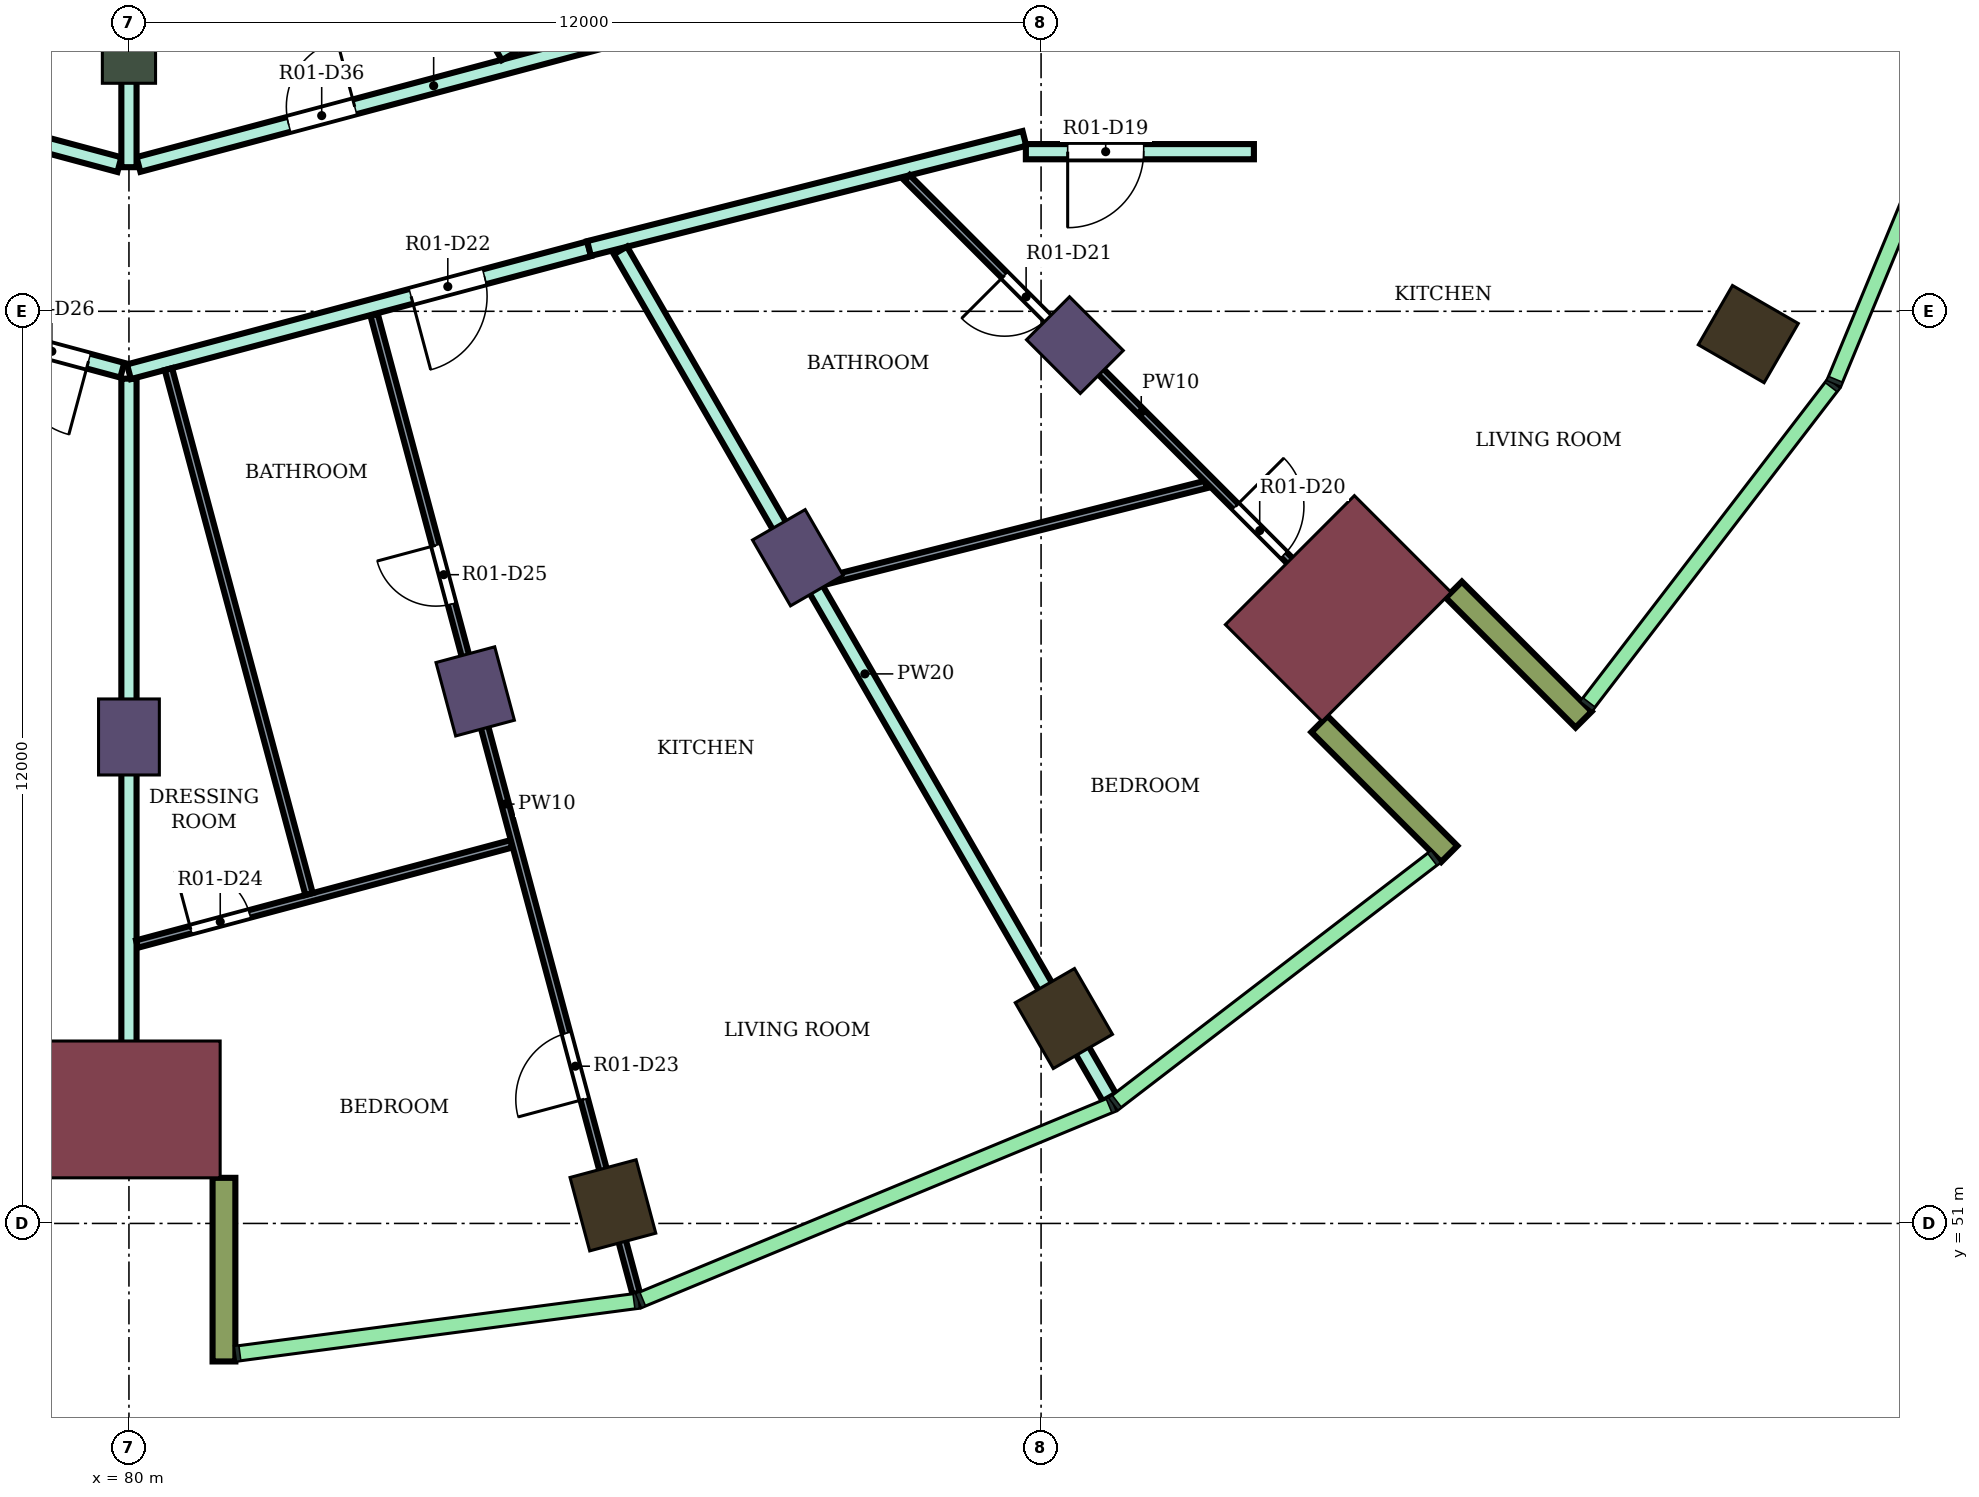
"""IFC4 building model, lengths in metres.
Left out: names, types, materials, properties, quantities, classifications, styles, units other than length and angle.
Written with IfcOpenShell. Run it as: python <this file> out.ifc"""

import sys

from ifc_helpers import new_model, si_unit, direction, frame, frame_2d, origin, origin_2d, place, context, subcontext, project, spatial, rectangle, extrude, element, fill, save


model = new_model("IFC4")
c1 = context("Model", 3, precision=1e-05, world=origin(), true_north=direction((0.0, 1.0)))
c2 = subcontext(c1, "Body", "Model", "MODEL_VIEW")
j1 = project(units=[si_unit("LENGTHUNIT", "METRE"), si_unit("PLANEANGLEUNIT", "RADIAN")], contexts=[c1])
p1 = place(None, origin())
s1 = spatial("IfcSite", under=j1, at=p1, CompositionType="ELEMENT")
p2 = place(p1, origin())
s2 = spatial("IfcBuilding", under=s1, at=p2, CompositionType="ELEMENT")
p3 = place(p2, frame((0.0, 0.0, 165.9)))
s3 = spatial("IfcBuildingStorey", under=s2, at=p3, CompositionType="ELEMENT", Elevation=165.9)
for number, where, z_axis, x_axis in (
    (1, (86.367, 51.238, 0.0), (0.0, 0.0, 1.0), (0.259, -0.966, 0.0)),
    (2, (92.3, 53.696, 0.0), (0.0, 0.0, 1.0), (0.5, -0.866, 0.0)),
    (3, (101.304, 62.7, 0.0), (0.0, 0.0, 1.0), (0.866, -0.5, 0.0)),
):
    element("IfcColumn", number, at=place(p3, frame(where, z_axis=z_axis, x_axis=x_axis)), inside=s3, PredefinedType="COLUMN", context=c2, shape_type="SweptSolid", body=[
        extrude(rectangle(XDim=1.0, YDim=0.9, at=origin_2d()), origin(), (0.0, 0.0, 1.0), 4.1),
    ])
for number, where, z_axis, x_axis in (
    (4, (80.0, 57.4, 0.0), (0.0, 0.0, 1.0), (0.0, -1.0, 0.0)),
    (5, (84.555, 58.0, 0.0), (0.0, 0.0, 1.0), (0.259, -0.966, 0.0)),
    (6, (88.8, 59.758, 0.0), (0.0, 0.0, 1.0), (0.5, -0.866, 0.0)),
    (7, (92.445, 62.555, 0.0), (0.0, 0.0, 1.0), (0.707, -0.707, 0.0)),
):
    element("IfcColumn", number, at=place(p3, frame(where, z_axis=z_axis, x_axis=x_axis)), inside=s3, PredefinedType="COLUMN", context=c2, shape_type="SweptSolid", body=[
        extrude(rectangle(XDim=1.0, YDim=0.8, at=origin_2d()), origin(), (0.0, 0.0, 1.0), 4.1),
    ])
p4 = place(p3, frame((80.0, 66.4, 0.0), z_axis=(0.0, 0.0, 1.0), x_axis=(0.0, -1.0, 0.0)))
e8 = element("IfcColumn", 8, at=p4, inside=s3, PredefinedType="COLUMN", context=c2, shape_type="SweptSolid", body=[
    extrude(rectangle(XDim=0.8, YDim=0.7, at=origin_2d()), origin(), (0.0, 0.0, 1.0), 4.1),
])
for number, where, z_axis, x_axis in (
    (9, (80.0, 52.5, 0.0), (0.0, 0.0, 1.0), (0.0, -1.0, 0.0)),
    (10, (95.91, 59.09, 0.0), (0.0, 0.0, 1.0), (0.707, -0.707, 0.0)),
):
    element("IfcColumn", number, at=place(p3, frame(where, z_axis=z_axis, x_axis=x_axis)), inside=s3, PredefinedType="COLUMN", context=c2, shape_type="SweptSolid", body=[
        extrude(rectangle(XDim=1.8, YDim=2.4, at=origin_2d()), origin(), (0.0, 0.0, 1.0), 4.1),
    ])
for number, where, z_axis, x_axis in (
    (11, (81.25, 51.6, 0.0), (0.0, 0.0, 1.0), (0.0, -1.0, 0.0)),
    (12, (95.662, 57.57, 0.0), (0.0, 0.0, 1.0), (0.707, -0.707, 0.0)),
    (13, (97.43, 59.338, 0.0), (0.0, 0.0, 1.0), (0.707, -0.707, 0.0)),
):
    element("IfcWall", number, at=place(p3, frame(where, z_axis=z_axis, x_axis=x_axis)), inside=s3, PredefinedType="NOTDEFINED", context=c2, shape_type="SweptSolid", body=[
        extrude(rectangle(XDim=2.416, YDim=0.3, at=frame_2d((1.208, 0.0))), origin(), (0.0, 0.0, 1.0), 4.1),
    ])
p5 = place(p3, frame((74.15, 63.772, 0.0), z_axis=(0.0, 0.0, 1.0), x_axis=(0.965807109237, -0.259261697417, 0.0)))
e14 = element("IfcWall", 14, at=p5, inside=s3, PredefinedType="PARTITIONING", context=c2, shape_type="SweptSolid", body=[
    extrude(rectangle(XDim=5.967, YDim=0.2, at=frame_2d((2.983, 0.0))), origin(), (0.0, 0.0, 1.0), 3.65),
])
p6 = place(p5, frame((4.507, 0.0, 0.0)))
e15 = element("IfcOpeningElement", 15, at=p6, cuts=e14, PredefinedType="OPENING", context=c2, shape_type="SweptSolid", body=[
    extrude(rectangle(XDim=1.0, YDim=2.1, at=frame_2d((0.5, 1.05))), frame((0.0, 0.11, 0.0), z_axis=(0.0, -1.0, 0.0), x_axis=(1.0, 0.0, 0.0)), (0.0, 0.0, 1.0), 0.22),
])
p7 = place(p3, frame((74.603, 66.342, 0.0), z_axis=(0.0, 0.0, 1.0), x_axis=(0.965920893652, -0.258837453254, 0.0)))
e16 = element("IfcWall", 16, at=p7, inside=s3, PredefinedType="PARTITIONING", context=c2, shape_type="SweptSolid", body=[
    extrude(rectangle(XDim=5.458, YDim=0.2, at=frame_2d((2.729, 0.0))), origin(), (0.0, 0.0, 1.0), 3.65),
])
p8 = place(p7, frame((2.512, 0.0, 0.0)))
e17 = element("IfcOpeningElement", 17, at=p8, cuts=e16, PredefinedType="OPENING", context=c2, shape_type="SweptSolid", body=[
    extrude(rectangle(XDim=0.9, YDim=2.1, at=frame_2d((0.45, 1.05))), frame((0.0, 0.11, 0.0), z_axis=(0.0, -1.0, 0.0), x_axis=(1.0, 0.0, 0.0)), (0.0, 0.0, 1.0), 0.22),
])
p9 = place(p3, frame((80.125, 64.932, 0.0), z_axis=(0.0, 0.0, 1.0), x_axis=(0.966236955806, 0.257655089674, 0.0)))
e18 = element("IfcWall", 18, at=p9, inside=s3, PredefinedType="PARTITIONING", context=c2, shape_type="SweptSolid", body=[
    extrude(rectangle(XDim=8.039, YDim=0.2, at=frame_2d((4.02, 0.0))), origin(), (0.0, 0.0, 1.0), 3.65),
])
p10 = place(p9, frame((6.298, 0.0, 0.0)))
e19 = element("IfcOpeningElement", 19, at=p10, cuts=e18, PredefinedType="OPENING", context=c2, shape_type="SweptSolid", body=[
    extrude(rectangle(XDim=0.9, YDim=2.1, at=frame_2d((0.45, 1.05))), frame((0.0, 0.11, 0.0), z_axis=(0.0, -1.0, 0.0), x_axis=(1.0, 0.0, 0.0)), (0.0, 0.0, 1.0), 0.22),
])
p11 = place(p9, frame((2.045, 0.0, 0.0)))
e20 = element("IfcOpeningElement", 20, at=p11, cuts=e18, PredefinedType="OPENING", context=c2, shape_type="SweptSolid", body=[
    extrude(rectangle(XDim=0.9, YDim=2.1, at=frame_2d((0.45, 1.05))), frame((0.0, 0.11, 0.0), z_axis=(0.0, -1.0, 0.0), x_axis=(1.0, 0.0, 0.0)), (0.0, 0.0, 1.0), 0.22),
])
p12 = place(p3, frame((80.0, 51.8, 0.0), z_axis=(0.0, 0.0, 1.0), x_axis=(0.0, 1.0, 0.0)))
e21 = element("IfcWall", 21, at=p12, inside=s3, PredefinedType="PARTITIONING", context=c2, shape_type="SweptSolid", body=[
    extrude(rectangle(XDim=10.314, YDim=0.2, at=frame_2d((5.157, 0.0))), origin(), (0.0, 0.0, 1.0), 3.65),
])
p13 = place(p3, frame((80.0, 62.205, 0.0), z_axis=(0.0, 0.0, 1.0), x_axis=(0.966104192593, 0.258152453124, 0.0)))
e22 = element("IfcWall", 22, at=p13, inside=s3, PredefinedType="PARTITIONING", context=c2, shape_type="SweptSolid", body=[
    extrude(rectangle(XDim=6.266, YDim=0.2, at=frame_2d((3.133, 0.0))), origin(), (0.0, 0.0, 1.0), 3.65),
])
p14 = place(p13, frame((3.842, 0.0, 0.0)))
e23 = element("IfcOpeningElement", 23, at=p14, cuts=e22, PredefinedType="OPENING", context=c2, shape_type="SweptSolid", body=[
    extrude(rectangle(XDim=1.0, YDim=2.1, at=frame_2d((0.5, 1.05))), frame((0.0, 0.11, 0.0), z_axis=(0.0, -1.0, 0.0), x_axis=(1.0, 0.0, 0.0)), (0.0, 0.0, 1.0), 0.22),
])
p15 = place(p3, frame((80.0, 64.896, 0.0), z_axis=(0.0, 0.0, 1.0), x_axis=(0.0, 1.0, 0.0)))
e24 = element("IfcWall", 24, at=p15, inside=s3, PredefinedType="PARTITIONING", context=c2, shape_type="SweptSolid", body=[
    extrude(rectangle(XDim=2.405, YDim=0.2, at=frame_2d((1.203, 0.0))), origin(), (0.0, 0.0, 1.0), 3.65),
])
p16 = place(p3, frame((83.85, 68.333, 0.0), z_axis=(0.0, 0.0, 1.0), x_axis=(0.499953638813, -0.866052168773, 0.0)))
e25 = element("IfcWall", 25, at=p16, inside=s3, PredefinedType="PARTITIONING", context=c2, shape_type="SweptSolid", body=[
    extrude(rectangle(XDim=2.285, YDim=0.2, at=frame_2d((1.143, 0.0))), origin(), (0.0, 0.0, 1.0), 3.65),
])
p17 = place(p3, frame((86.053, 63.826, 0.0), z_axis=(0.0, 0.0, 1.0), x_axis=(0.969490004987, 0.245130843083, 0.0)))
e26 = element("IfcWall", 26, at=p17, inside=s3, PredefinedType="PARTITIONING", context=c2, shape_type="SweptSolid", body=[
    extrude(rectangle(XDim=5.908, YDim=0.2, at=frame_2d((2.954, 0.0))), origin(), (0.0, 0.0, 1.0), 3.65),
])
p18 = place(p3, frame((86.466, 63.801, 0.0), z_axis=(0.0, 0.0, 1.0), x_axis=(0.499951314491, -0.866053510551, 0.0)))
e27 = element("IfcWall", 27, at=p18, inside=s3, PredefinedType="PARTITIONING", context=c2, shape_type="SweptSolid", body=[
    extrude(rectangle(XDim=12.866, YDim=0.2, at=frame_2d((6.433, 0.0))), origin(), (0.0, 0.0, 1.0), 3.65),
])
p19 = place(p3, frame((91.8, 65.1, 0.0), z_axis=(0.0, 0.0, 1.0), x_axis=(1.0, 0.0, 0.0)))
e28 = element("IfcWall", 28, at=p19, inside=s3, PredefinedType="PARTITIONING", context=c2, shape_type="SweptSolid", body=[
    extrude(rectangle(XDim=3.0, YDim=0.2, at=frame_2d((1.5, 0.0))), origin(), (0.0, 0.0, 1.0), 3.65),
])
p20 = place(p19, frame((0.55, 0.0, 0.0)))
e29 = element("IfcOpeningElement", 29, at=p20, cuts=e28, PredefinedType="OPENING", context=c2, shape_type="SweptSolid", body=[
    extrude(rectangle(XDim=1.0, YDim=2.1, at=frame_2d((0.5, 1.05))), frame((0.0, 0.11, 0.0), z_axis=(0.0, -1.0, 0.0), x_axis=(1.0, 0.0, 0.0)), (0.0, 0.0, 1.0), 0.22),
])
p21 = place(p3, frame((80.106, 54.676, 0.0), z_axis=(0.0, 0.0, 1.0), x_axis=(0.965976901679, 0.258628353863, 0.0)))
e30 = element("IfcWall", 30, at=p21, inside=s3, PredefinedType="PARTITIONING", context=c2, shape_type="SweptSolid", body=[
    extrude(rectangle(XDim=5.097, YDim=0.1, at=frame_2d((2.549, 0.0))), origin(), (0.0, 0.0, 1.0), 3.65),
])
p22 = place(p21, frame((0.733, 0.0, 0.0)))
e31 = element("IfcOpeningElement", 31, at=p22, cuts=e30, PredefinedType="OPENING", context=c2, shape_type="SweptSolid", body=[
    extrude(rectangle(XDim=0.8, YDim=2.1, at=frame_2d((0.4, 1.05))), frame((0.0, 0.06, 0.0), z_axis=(0.0, -1.0, 0.0), x_axis=(1.0, 0.0, 0.0)), (0.0, 0.0, 1.0), 0.12),
])
p23 = place(p3, frame((80.519, 62.239, 0.0), z_axis=(0.0, 0.0, 1.0), x_axis=(0.25878046533, -0.965936162882, 0.0)))
e32 = element("IfcWall", 32, at=p23, inside=s3, PredefinedType="PARTITIONING", context=c2, shape_type="SweptSolid", body=[
    extrude(rectangle(XDim=7.149, YDim=0.1, at=frame_2d((3.575, 0.0))), origin(), (0.0, 0.0, 1.0), 3.65),
])
p24 = place(p3, frame((83.225, 62.954, 0.0), z_axis=(0.0, 0.0, 1.0), x_axis=(0.258715941946, -0.965953446799, 0.0)))
e33 = element("IfcWall", 33, at=p24, inside=s3, PredefinedType="PARTITIONING", context=c2, shape_type="SweptSolid", body=[
    extrude(rectangle(XDim=13.328, YDim=0.1, at=frame_2d((6.664, 0.0))), origin(), (0.0, 0.0, 1.0), 3.65),
])
p25 = place(p24, frame((9.784, 0.0, 0.0)))
e34 = element("IfcOpeningElement", 34, at=p25, cuts=e33, PredefinedType="OPENING", context=c2, shape_type="SweptSolid", body=[
    extrude(rectangle(XDim=0.9, YDim=2.1, at=frame_2d((0.45, 1.05))), frame((0.0, 0.06, 0.0), z_axis=(0.0, -1.0, 0.0), x_axis=(1.0, 0.0, 0.0)), (0.0, 0.0, 1.0), 0.12),
])
p26 = place(p24, frame((3.14, 0.0, 0.0)))
e35 = element("IfcOpeningElement", 35, at=p26, cuts=e33, PredefinedType="OPENING", context=c2, shape_type="SweptSolid", body=[
    extrude(rectangle(XDim=0.8, YDim=2.1, at=frame_2d((0.4, 1.05))), frame((0.0, 0.06, 0.0), z_axis=(0.0, -1.0, 0.0), x_axis=(1.0, 0.0, 0.0)), (0.0, 0.0, 1.0), 0.12),
])
p27 = place(p3, frame((89.106, 59.441, 0.0), z_axis=(0.0, 0.0, 1.0), x_axis=(0.969462385749, 0.245240051009, 0.0)))
e36 = element("IfcWall", 36, at=p27, inside=s3, PredefinedType="PARTITIONING", context=c2, shape_type="SweptSolid", body=[
    extrude(rectangle(XDim=5.223, YDim=0.1, at=frame_2d((2.612, 0.0))), origin(), (0.0, 0.0, 1.0), 3.65),
])
p28 = place(p3, frame((90.236, 64.758, 0.0), z_axis=(0.0, 0.0, 1.0), x_axis=(0.706938769128, -0.707274753334, 0.0)))
e37 = element("IfcWall", 37, at=p28, inside=s3, PredefinedType="PARTITIONING", context=c2, shape_type="SweptSolid", body=[
    extrude(rectangle(XDim=8.72, YDim=0.1, at=frame_2d((4.36, 0.0))), origin(), (0.0, 0.0, 1.0), 3.65),
])
p29 = place(p28, frame((6.115, 0.0, 0.0)))
e38 = element("IfcOpeningElement", 38, at=p29, cuts=e37, PredefinedType="OPENING", context=c2, shape_type="SweptSolid", body=[
    extrude(rectangle(XDim=0.9, YDim=2.1, at=frame_2d((0.45, 1.05))), frame((0.0, 0.06, 0.0), z_axis=(0.0, -1.0, 0.0), x_axis=(1.0, 0.0, 0.0)), (0.0, 0.0, 1.0), 0.12),
])
p30 = place(p28, frame((1.817, 0.0, 0.0)))
e39 = element("IfcOpeningElement", 39, at=p30, cuts=e37, PredefinedType="OPENING", context=c2, shape_type="SweptSolid", body=[
    extrude(rectangle(XDim=0.8, YDim=2.1, at=frame_2d((0.4, 1.05))), frame((0.0, 0.06, 0.0), z_axis=(0.0, -1.0, 0.0), x_axis=(1.0, 0.0, 0.0)), (0.0, 0.0, 1.0), 0.12),
])
p31 = place(p20, frame((1.0, 0.0, 0.0), z_axis=(0.0, 0.0, 1.0), x_axis=(-1.0, 0.0, 0.0)))
e40 = element("IfcDoor", 40, at=p31, inside=s3, OperationType="SINGLE_SWING_RIGHT", PredefinedType="DOOR", context=c2, shape_type="SweptSolid", body=[
    extrude(rectangle(XDim=1.0, YDim=2.1, at=frame_2d((0.5, 1.05))), frame((0.0, 0.025, 0.0), z_axis=(0.0, -1.0, 0.0), x_axis=(1.0, 0.0, 0.0)), (0.0, 0.0, 1.0), 0.05),
])
fill(e29, e40)
p32 = place(p29, origin())
e41 = element("IfcDoor", 41, at=p32, inside=s3, OperationType="SINGLE_SWING_LEFT", PredefinedType="DOOR", context=c2, shape_type="SweptSolid", body=[
    extrude(rectangle(XDim=0.9, YDim=2.1, at=frame_2d((0.45, 1.05))), frame((0.0, 0.025, 0.0), z_axis=(0.0, -1.0, 0.0), x_axis=(1.0, 0.0, 0.0)), (0.0, 0.0, 1.0), 0.05),
])
fill(e38, e41)
p33 = place(p30, frame((0.8, 0.0, 0.0), z_axis=(0.0, 0.0, 1.0), x_axis=(-1.0, 0.0, 0.0)))
e42 = element("IfcDoor", 42, at=p33, inside=s3, OperationType="SINGLE_SWING_RIGHT", PredefinedType="DOOR", context=c2, shape_type="SweptSolid", body=[
    extrude(rectangle(XDim=0.8, YDim=2.1, at=frame_2d((0.4, 1.05))), frame((0.0, 0.025, 0.0), z_axis=(0.0, -1.0, 0.0), x_axis=(1.0, 0.0, 0.0)), (0.0, 0.0, 1.0), 0.05),
])
fill(e39, e42)
p34 = place(p14, frame((1.0, 0.0, 0.0), z_axis=(0.0, 0.0, 1.0), x_axis=(-1.0, 0.0, 0.0)))
e43 = element("IfcDoor", 43, at=p34, inside=s3, OperationType="SINGLE_SWING_RIGHT", PredefinedType="DOOR", context=c2, shape_type="SweptSolid", body=[
    extrude(rectangle(XDim=1.0, YDim=2.1, at=frame_2d((0.5, 1.05))), frame((0.0, 0.025, 0.0), z_axis=(0.0, -1.0, 0.0), x_axis=(1.0, 0.0, 0.0)), (0.0, 0.0, 1.0), 0.05),
])
fill(e23, e43)
p35 = place(p25, frame((0.9, 0.0, 0.0), z_axis=(0.0, 0.0, 1.0), x_axis=(-1.0, 0.0, 0.0)))
e44 = element("IfcDoor", 44, at=p35, inside=s3, OperationType="SINGLE_SWING_LEFT", PredefinedType="DOOR", context=c2, shape_type="SweptSolid", body=[
    extrude(rectangle(XDim=0.9, YDim=2.1, at=frame_2d((0.45, 1.05))), frame((0.0, 0.025, 0.0), z_axis=(0.0, -1.0, 0.0), x_axis=(1.0, 0.0, 0.0)), (0.0, 0.0, 1.0), 0.05),
])
fill(e34, e44)
p36 = place(p22, origin())
e45 = element("IfcDoor", 45, at=p36, inside=s3, OperationType="SINGLE_SWING_LEFT", PredefinedType="DOOR", context=c2, shape_type="SweptSolid", body=[
    extrude(rectangle(XDim=0.8, YDim=2.1, at=frame_2d((0.4, 1.05))), frame((0.0, 0.025, 0.0), z_axis=(0.0, -1.0, 0.0), x_axis=(1.0, 0.0, 0.0)), (0.0, 0.0, 1.0), 0.05),
])
fill(e31, e45)
p37 = place(p26, frame((0.8, 0.0, 0.0), z_axis=(0.0, 0.0, 1.0), x_axis=(-1.0, 0.0, 0.0)))
e46 = element("IfcDoor", 46, at=p37, inside=s3, OperationType="SINGLE_SWING_RIGHT", PredefinedType="DOOR", context=c2, shape_type="SweptSolid", body=[
    extrude(rectangle(XDim=0.8, YDim=2.1, at=frame_2d((0.4, 1.05))), frame((0.0, 0.025, 0.0), z_axis=(0.0, -1.0, 0.0), x_axis=(1.0, 0.0, 0.0)), (0.0, 0.0, 1.0), 0.05),
])
fill(e35, e46)
p38 = place(p6, frame((1.0, 0.0, 0.0), z_axis=(0.0, 0.0, 1.0), x_axis=(-1.0, 0.0, 0.0)))
e47 = element("IfcDoor", 47, at=p38, inside=s3, OperationType="SINGLE_SWING_LEFT", PredefinedType="DOOR", context=c2, shape_type="SweptSolid", body=[
    extrude(rectangle(XDim=1.0, YDim=2.1, at=frame_2d((0.5, 1.05))), frame((0.0, 0.025, 0.0), z_axis=(0.0, -1.0, 0.0), x_axis=(1.0, 0.0, 0.0)), (0.0, 0.0, 1.0), 0.05),
])
fill(e15, e47)
p39 = place(p11, origin())
e48 = element("IfcDoor", 48, at=p39, inside=s3, OperationType="SINGLE_SWING_RIGHT", PredefinedType="DOOR", context=c2, shape_type="SweptSolid", body=[
    extrude(rectangle(XDim=0.9, YDim=2.1, at=frame_2d((0.45, 1.05))), frame((0.0, 0.025, 0.0), z_axis=(0.0, -1.0, 0.0), x_axis=(1.0, 0.0, 0.0)), (0.0, 0.0, 1.0), 0.05),
])
fill(e20, e48)
save(model, sys.argv[1])
